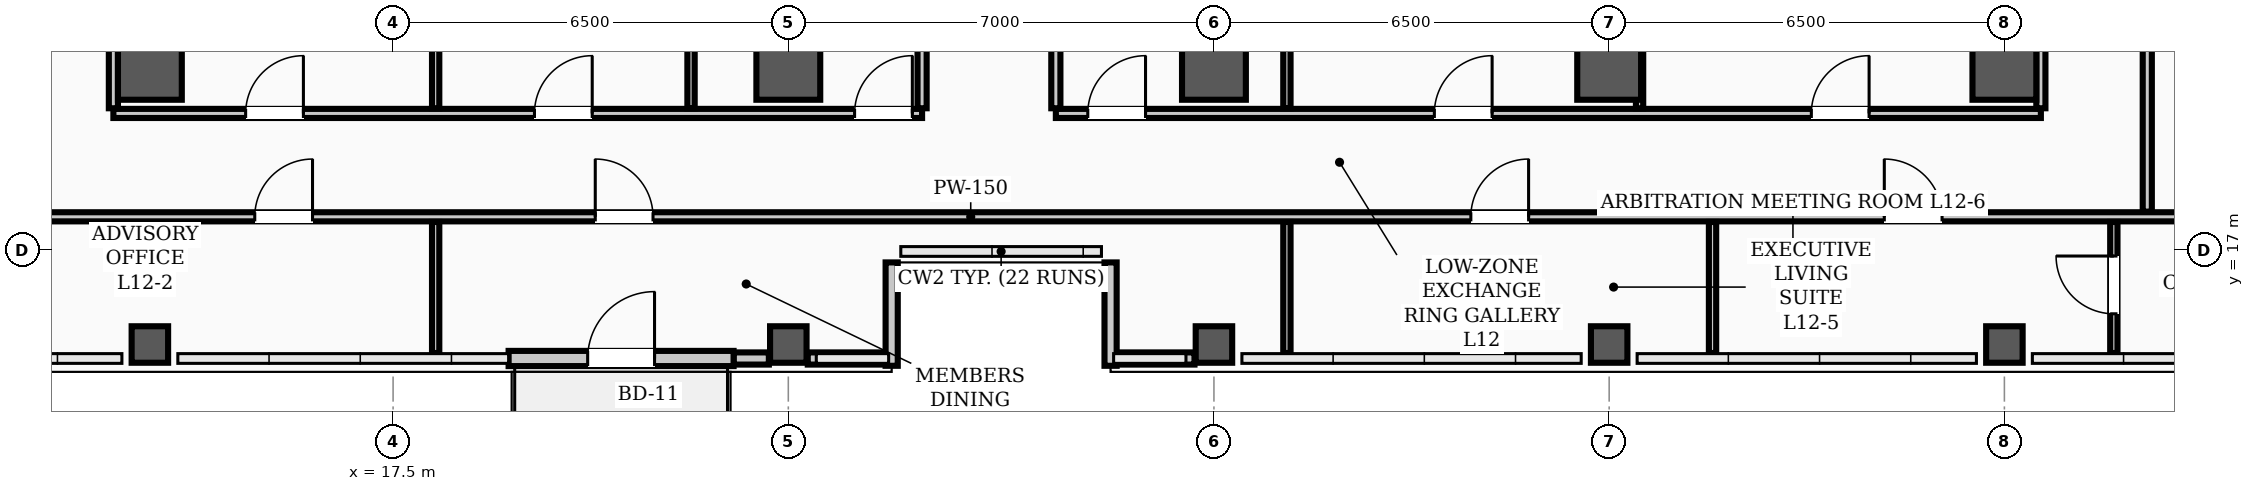
"""IFC4 building model, lengths in metres.
Left out: names, types, materials, properties, quantities, classifications, styles, units other than length and angle.
Written with IfcOpenShell. Run it as: python <this file> out.ifc"""

import sys

from ifc_helpers import new_model, si_unit, direction, frame, frame_2d, origin, origin_2d, place, context, subcontext, project, spatial, rectangle, hollow_rectangle, extrude, element, fill, save


model = new_model("IFC4")
c1 = context("Model", 3, precision=1e-05, world=origin(), true_north=direction((0.0, 1.0)))
c2 = subcontext(c1, "Body", "Model", "MODEL_VIEW")
j1 = project(units=[si_unit("LENGTHUNIT", "METRE"), si_unit("PLANEANGLEUNIT", "RADIAN")], contexts=[c1])
p1 = place(None, origin())
s1 = spatial("IfcSite", under=j1, at=p1, CompositionType="ELEMENT")
p2 = place(p1, origin())
s2 = spatial("IfcBuilding", under=s1, at=p2, CompositionType="ELEMENT")
p3 = place(p2, frame((0.0, 0.0, 49.9)))
s3 = spatial("IfcBuildingStorey", under=s2, at=p3, CompositionType="ELEMENT", Elevation=49.9)
for number, where, z_axis, x_axis in (
    (1, (13.5, 20.0, 0.0), (0.0, 0.0, 1.0), (1.0, 0.0, 0.0)),
    (2, (24.0, 20.0, 0.0), (0.0, 0.0, 1.0), (1.0, 0.0, 0.0)),
    (3, (31.0, 20.0, 0.0), (0.0, 0.0, 1.0), (1.0, 0.0, 0.0)),
    (4, (37.5, 20.0, 0.0), (0.0, 0.0, 1.0), (1.0, 0.0, 0.0)),
    (5, (44.0, 20.0, 0.0), (0.0, 0.0, 1.0), (1.0, 0.0, 0.0)),
):
    element("IfcColumn", number, at=place(p3, frame(where, z_axis=z_axis, x_axis=x_axis)), inside=s3, PredefinedType="COLUMN", context=c2, shape_type="SweptSolid", body=[
        extrude(hollow_rectangle(XDim=1.05, YDim=1.05, WallThickness=0.038, InnerFilletRadius=0.019, OuterFilletRadius=0.057, at=origin_2d()), origin(), (0.0, 0.0, 1.0), 3.9),
    ])
for number, where, z_axis, x_axis in (
    (6, (13.5, 15.45, 0.0), (0.0, 0.0, 1.0), (1.0, 0.0, 0.0)),
    (7, (24.0, 15.45, 0.0), (0.0, 0.0, 1.0), (1.0, 0.0, 0.0)),
    (8, (31.0, 15.45, 0.0), (0.0, 0.0, 1.0), (1.0, 0.0, 0.0)),
    (9, (37.5, 15.45, 0.0), (0.0, 0.0, 1.0), (1.0, 0.0, 0.0)),
    (10, (44.0, 15.45, 0.0), (0.0, 0.0, 1.0), (1.0, 0.0, 0.0)),
):
    element("IfcColumn", number, at=place(p3, frame(where, z_axis=z_axis, x_axis=x_axis)), inside=s3, PredefinedType="COLUMN", context=c2, shape_type="SweptSolid", body=[
        extrude(hollow_rectangle(XDim=0.6, YDim=0.6, WallThickness=0.026, InnerFilletRadius=0.013, OuterFilletRadius=0.039, at=origin_2d()), origin(), (0.0, 0.0, 1.0), 3.9),
    ])
p4 = place(p3, frame((23.1, 15.22, 0.0), z_axis=(0.0, 0.0, 1.0), x_axis=(1.0, 0.0, 0.0)))
e11 = element("IfcWall", 11, at=p4, inside=s3, PredefinedType="PARAPET", context=c2, shape_type="SweptSolid", body=[
    extrude(rectangle(XDim=0.58, YDim=0.2, at=frame_2d((0.29, 0.0))), origin(), (0.0, 0.0, 1.0), 1.2),
])
for number, where, z_axis, x_axis in (
    (12, (24.32, 15.22, 0.0), (0.0, 0.0, 1.0), (1.0, 0.0, 0.0)),
    (13, (29.35, 15.22, 0.0), (0.0, 0.0, 1.0), (1.0, 0.0, 0.0)),
):
    element("IfcWall", number, at=place(p3, frame(where, z_axis=z_axis, x_axis=x_axis)), inside=s3, PredefinedType="PARAPET", context=c2, shape_type="SweptSolid", body=[
        extrude(rectangle(XDim=1.33, YDim=0.2, at=frame_2d((0.665, 0.0))), origin(), (0.0, 0.0, 1.0), 1.2),
    ])
for number, where, z_axis, x_axis in (
    (14, (25.7, 15.1, 0.0), (0.0, 0.0, 1.0), (0.0, 1.0, 0.0)),
    (15, (29.3, 16.8, 0.0), (0.0, 0.0, 1.0), (0.0, -1.0, 0.0)),
):
    element("IfcWall", number, at=place(p3, frame(where, z_axis=z_axis, x_axis=x_axis)), inside=s3, PredefinedType="PARAPET", context=c2, shape_type="SweptSolid", body=[
        extrude(rectangle(XDim=1.7, YDim=0.2, at=frame_2d((0.85, 0.0))), origin(), (0.0, 0.0, 1.0), 1.2),
    ])
p5 = place(p3, frame((19.4, 15.22, 0.0), z_axis=(0.0, 0.0, 1.0), x_axis=(1.0, 0.0, 0.0)))
e16 = element("IfcWall", 16, at=p5, inside=s3, PredefinedType="STANDARD", context=c2, shape_type="SweptSolid", body=[
    extrude(rectangle(XDim=3.7, YDim=0.25, at=frame_2d((1.85, 0.0))), origin(), (0.0, 0.0, 1.0), 2.22),
])
p6 = place(p5, frame((1.3, 0.0, 0.0)))
e17 = element("IfcOpeningElement", 17, at=p6, cuts=e16, PredefinedType="OPENING", context=c2, shape_type="SweptSolid", body=[
    extrude(rectangle(XDim=1.1, YDim=2.2, at=frame_2d((0.55, 1.1))), frame((0.0, 0.135, 0.0), z_axis=(0.0, -1.0, 0.0), x_axis=(1.0, 0.0, 0.0)), (0.0, 0.0, 1.0), 0.27),
])
p7 = place(p3, frame((4.66, 17.55, 0.0), z_axis=(0.0, 0.0, 1.0), x_axis=(1.0, 0.0, 0.0)))
e18 = element("IfcWall", 18, at=p7, inside=s3, PredefinedType="PARTITIONING", context=c2, shape_type="SweptSolid", body=[
    extrude(rectangle(XDim=44.68, YDim=0.15, at=frame_2d((22.34, 0.0))), origin(), (0.0, 0.0, 1.0), 2.24),
])
p8 = place(p7, frame((10.565, 0.0, 0.0)))
e19 = element("IfcOpeningElement", 19, at=p8, cuts=e18, PredefinedType="OPENING", context=c2, shape_type="SweptSolid", body=[
    extrude(rectangle(XDim=0.95, YDim=2.08, at=frame_2d((0.475, 1.04))), frame((0.0, 0.085, 0.0), z_axis=(0.0, -1.0, 0.0), x_axis=(1.0, 0.0, 0.0)), (0.0, 0.0, 1.0), 0.17),
])
p9 = place(p7, frame((16.165, 0.0, 0.0)))
e20 = element("IfcOpeningElement", 20, at=p9, cuts=e18, PredefinedType="OPENING", context=c2, shape_type="SweptSolid", body=[
    extrude(rectangle(XDim=0.95, YDim=2.08, at=frame_2d((0.475, 1.04))), frame((0.0, 0.085, 0.0), z_axis=(0.0, -1.0, 0.0), x_axis=(1.0, 0.0, 0.0)), (0.0, 0.0, 1.0), 0.17),
])
p10 = place(p7, frame((30.565, 0.0, 0.0)))
e21 = element("IfcOpeningElement", 21, at=p10, cuts=e18, PredefinedType="OPENING", context=c2, shape_type="SweptSolid", body=[
    extrude(rectangle(XDim=0.95, YDim=2.08, at=frame_2d((0.475, 1.04))), frame((0.0, 0.085, 0.0), z_axis=(0.0, -1.0, 0.0), x_axis=(1.0, 0.0, 0.0)), (0.0, 0.0, 1.0), 0.17),
])
p11 = place(p7, frame((37.365, 0.0, 0.0)))
e22 = element("IfcOpeningElement", 22, at=p11, cuts=e18, PredefinedType="OPENING", context=c2, shape_type="SweptSolid", body=[
    extrude(rectangle(XDim=0.95, YDim=2.08, at=frame_2d((0.475, 1.04))), frame((0.0, 0.085, 0.0), z_axis=(0.0, -1.0, 0.0), x_axis=(1.0, 0.0, 0.0)), (0.0, 0.0, 1.0), 0.17),
])
p12 = place(p3, frame((12.9, 19.25, 0.0), z_axis=(0.0, 0.0, 1.0), x_axis=(1.0, 0.0, 0.0)))
e23 = element("IfcWall", 23, at=p12, inside=s3, PredefinedType="PARTITIONING", context=c2, shape_type="SweptSolid", body=[
    extrude(rectangle(XDim=13.3, YDim=0.15, at=frame_2d((6.65, 0.0))), origin(), (0.0, 0.0, 1.0), 2.24),
])
p13 = place(p12, frame((2.175, 0.0, 0.0)))
e24 = element("IfcOpeningElement", 24, at=p13, cuts=e23, PredefinedType="OPENING", context=c2, shape_type="SweptSolid", body=[
    extrude(rectangle(XDim=0.95, YDim=2.08, at=frame_2d((0.475, 1.04))), frame((0.0, 0.085, 0.0), z_axis=(0.0, -1.0, 0.0), x_axis=(1.0, 0.0, 0.0)), (0.0, 0.0, 1.0), 0.17),
])
p14 = place(p12, frame((6.925, 0.0, 0.0)))
e25 = element("IfcOpeningElement", 25, at=p14, cuts=e23, PredefinedType="OPENING", context=c2, shape_type="SweptSolid", body=[
    extrude(rectangle(XDim=0.95, YDim=2.08, at=frame_2d((0.475, 1.04))), frame((0.0, 0.085, 0.0), z_axis=(0.0, -1.0, 0.0), x_axis=(1.0, 0.0, 0.0)), (0.0, 0.0, 1.0), 0.17),
])
p15 = place(p12, frame((12.19, 0.0, 0.0)))
e26 = element("IfcOpeningElement", 26, at=p15, cuts=e23, PredefinedType="OPENING", context=c2, shape_type="SweptSolid", body=[
    extrude(rectangle(XDim=0.95, YDim=2.08, at=frame_2d((0.475, 1.04))), frame((0.0, 0.085, 0.0), z_axis=(0.0, -1.0, 0.0), x_axis=(1.0, 0.0, 0.0)), (0.0, 0.0, 1.0), 0.17),
])
p16 = place(p3, frame((28.4, 19.25, 0.0), z_axis=(0.0, 0.0, 1.0), x_axis=(1.0, 0.0, 0.0)))
e27 = element("IfcWall", 27, at=p16, inside=s3, PredefinedType="PARTITIONING", context=c2, shape_type="SweptSolid", body=[
    extrude(rectangle(XDim=16.2, YDim=0.15, at=frame_2d((8.1, 0.0))), origin(), (0.0, 0.0, 1.0), 2.24),
])
p17 = place(p16, frame((0.525, 0.0, 0.0)))
e28 = element("IfcOpeningElement", 28, at=p17, cuts=e27, PredefinedType="OPENING", context=c2, shape_type="SweptSolid", body=[
    extrude(rectangle(XDim=0.95, YDim=2.08, at=frame_2d((0.475, 1.04))), frame((0.0, 0.085, 0.0), z_axis=(0.0, -1.0, 0.0), x_axis=(1.0, 0.0, 0.0)), (0.0, 0.0, 1.0), 0.17),
])
p18 = place(p16, frame((6.225, 0.0, 0.0)))
e29 = element("IfcOpeningElement", 29, at=p18, cuts=e27, PredefinedType="OPENING", context=c2, shape_type="SweptSolid", body=[
    extrude(rectangle(XDim=0.95, YDim=2.08, at=frame_2d((0.475, 1.04))), frame((0.0, 0.085, 0.0), z_axis=(0.0, -1.0, 0.0), x_axis=(1.0, 0.0, 0.0)), (0.0, 0.0, 1.0), 0.17),
])
p19 = place(p16, frame((12.425, 0.0, 0.0)))
e30 = element("IfcOpeningElement", 30, at=p19, cuts=e27, PredefinedType="OPENING", context=c2, shape_type="SweptSolid", body=[
    extrude(rectangle(XDim=0.95, YDim=2.08, at=frame_2d((0.475, 1.04))), frame((0.0, 0.085, 0.0), z_axis=(0.0, -1.0, 0.0), x_axis=(1.0, 0.0, 0.0)), (0.0, 0.0, 1.0), 0.17),
])
for number, where, z_axis, x_axis in (
    (31, (26.2, 19.335, 0.0), (0.0, 0.0, 1.0), (0.0, 1.0, 0.0)),
    (32, (28.4, 19.335, 0.0), (0.0, 0.0, 1.0), (0.0, 1.0, 0.0)),
    (33, (12.9, 19.335, 0.0), (0.0, 0.0, 1.0), (0.0, 1.0, 0.0)),
):
    element("IfcWall", number, at=place(p3, frame(where, z_axis=z_axis, x_axis=x_axis)), inside=s3, PredefinedType="PARTITIONING", context=c2, shape_type="SweptSolid", body=[
        extrude(rectangle(XDim=7.38, YDim=0.15, at=frame_2d((3.69, 0.0))), origin(), (0.0, 0.0, 1.0), 2.24),
    ])
p20 = place(p3, frame((46.35, 17.635, 0.0), z_axis=(0.0, 0.0, 1.0), x_axis=(0.0, 1.0, 0.0)))
e34 = element("IfcWall", 34, at=p20, inside=s3, PredefinedType="PARTITIONING", context=c2, shape_type="SweptSolid", body=[
    extrude(rectangle(XDim=22.53, YDim=0.15, at=frame_2d((11.265, 0.0))), origin(), (0.0, 0.0, 1.0), 2.24),
])
p21 = place(p20, frame((3.465, 0.0, 0.0)))
e35 = element("IfcOpeningElement", 35, at=p21, cuts=e34, PredefinedType="OPENING", context=c2, shape_type="SweptSolid", body=[
    extrude(rectangle(XDim=0.95, YDim=2.08, at=frame_2d((0.475, 1.04))), frame((0.0, 0.085, 0.0), z_axis=(0.0, -1.0, 0.0), x_axis=(1.0, 0.0, 0.0)), (0.0, 0.0, 1.0), 0.17),
])
p22 = place(p20, frame((8.69, 0.0, 0.0)))
e36 = element("IfcOpeningElement", 36, at=p22, cuts=e34, PredefinedType="OPENING", context=c2, shape_type="SweptSolid", body=[
    extrude(rectangle(XDim=0.95, YDim=2.08, at=frame_2d((0.475, 1.04))), frame((0.0, 0.085, 0.0), z_axis=(0.0, -1.0, 0.0), x_axis=(1.0, 0.0, 0.0)), (0.0, 0.0, 1.0), 0.17),
])
p23 = place(p20, frame((15.69, 0.0, 0.0)))
e37 = element("IfcOpeningElement", 37, at=p23, cuts=e34, PredefinedType="OPENING", context=c2, shape_type="SweptSolid", body=[
    extrude(rectangle(XDim=0.95, YDim=2.08, at=frame_2d((0.475, 1.04))), frame((0.0, 0.085, 0.0), z_axis=(0.0, -1.0, 0.0), x_axis=(1.0, 0.0, 0.0)), (0.0, 0.0, 1.0), 0.17),
])
p24 = place(p20, frame((20.115, 0.0, 0.0)))
e38 = element("IfcOpeningElement", 38, at=p24, cuts=e34, PredefinedType="OPENING", context=c2, shape_type="SweptSolid", body=[
    extrude(rectangle(XDim=0.95, YDim=2.08, at=frame_2d((0.475, 1.04))), frame((0.0, 0.085, 0.0), z_axis=(0.0, -1.0, 0.0), x_axis=(1.0, 0.0, 0.0)), (0.0, 0.0, 1.0), 0.17),
])
p25 = place(p3, frame((44.6, 19.335, 0.0), z_axis=(0.0, 0.0, 1.0), x_axis=(0.0, 1.0, 0.0)))
e39 = element("IfcWall", 39, at=p25, inside=s3, PredefinedType="PARTITIONING", context=c2, shape_type="SweptSolid", body=[
    extrude(rectangle(XDim=7.38, YDim=0.15, at=frame_2d((3.69, 0.0))), origin(), (0.0, 0.0, 1.0), 2.24),
])
for number, where, z_axis, x_axis in (
    (40, (18.2, 15.31, 0.0), (0.0, 0.0, 1.0), (0.0, 1.0, 0.0)),
    (41, (32.2, 15.31, 0.0), (0.0, 0.0, 1.0), (0.0, 1.0, 0.0)),
    (42, (39.2, 15.31, 0.0), (0.0, 0.0, 1.0), (0.0, 1.0, 0.0)),
):
    element("IfcWall", number, at=place(p3, frame(where, z_axis=z_axis, x_axis=x_axis)), inside=s3, PredefinedType="PARTITIONING", context=c2, shape_type="SweptSolid", body=[
        extrude(rectangle(XDim=2.155, YDim=0.12, at=frame_2d((1.078, 0.0))), origin(), (0.0, 0.0, 1.0), 2.24),
    ])
p26 = place(p3, frame((45.8, 15.31, 0.0), z_axis=(0.0, 0.0, 1.0), x_axis=(0.0, 1.0, 0.0)))
e43 = element("IfcWall", 43, at=p26, inside=s3, PredefinedType="PARTITIONING", context=c2, shape_type="SweptSolid", body=[
    extrude(rectangle(XDim=2.155, YDim=0.12, at=frame_2d((1.078, 0.0))), origin(), (0.0, 0.0, 1.0), 3.66),
])
p27 = place(p26, frame((0.645, 0.0, 0.0)))
e44 = element("IfcOpeningElement", 44, at=p27, cuts=e43, PredefinedType="OPENING", context=c2, shape_type="SweptSolid", body=[
    extrude(rectangle(XDim=0.95, YDim=2.08, at=frame_2d((0.475, 1.04))), frame((0.0, 0.07, 0.0), z_axis=(0.0, -1.0, 0.0), x_axis=(1.0, 0.0, 0.0)), (0.0, 0.0, 1.0), 0.14),
])
for number, where, z_axis, x_axis in (
    (45, (18.2, 19.335, 0.0), (0.0, 0.0, 1.0), (0.0, 1.0, 0.0)),
    (46, (22.4, 19.335, 0.0), (0.0, 0.0, 1.0), (0.0, 1.0, 0.0)),
    (47, (32.2, 19.335, 0.0), (0.0, 0.0, 1.0), (0.0, 1.0, 0.0)),
    (48, (38.0, 19.335, 0.0), (0.0, 0.0, 1.0), (0.0, 1.0, 0.0)),
):
    element("IfcWall", number, at=place(p3, frame(where, z_axis=z_axis, x_axis=x_axis)), inside=s3, PredefinedType="PARTITIONING", context=c2, shape_type="SweptSolid", body=[
        extrude(rectangle(XDim=7.38, YDim=0.12, at=frame_2d((3.69, 0.0))), origin(), (0.0, 0.0, 1.0), 2.24),
    ])
p28 = place(p6, origin())
e49 = element("IfcDoor", 49, at=p28, inside=s3, OperationType="SINGLE_SWING_RIGHT", PredefinedType="DOOR", context=c2, shape_type="SweptSolid", body=[
    extrude(rectangle(XDim=1.1, YDim=2.2, at=frame_2d((0.55, 1.1))), frame((0.0, 0.025, 0.0), z_axis=(0.0, -1.0, 0.0), x_axis=(1.0, 0.0, 0.0)), (0.0, 0.0, 1.0), 0.05),
])
fill(e17, e49)
p29 = place(p8, origin())
e50 = element("IfcDoor", 50, at=p29, inside=s3, OperationType="SINGLE_SWING_RIGHT", PredefinedType="DOOR", context=c2, shape_type="SweptSolid", body=[
    extrude(rectangle(XDim=0.95, YDim=2.08, at=frame_2d((0.475, 1.04))), frame((0.0, 0.025, 0.0), z_axis=(0.0, -1.0, 0.0), x_axis=(1.0, 0.0, 0.0)), (0.0, 0.0, 1.0), 0.05),
])
fill(e19, e50)
p30 = place(p9, origin())
e51 = element("IfcDoor", 51, at=p30, inside=s3, OperationType="SINGLE_SWING_LEFT", PredefinedType="DOOR", context=c2, shape_type="SweptSolid", body=[
    extrude(rectangle(XDim=0.95, YDim=2.08, at=frame_2d((0.475, 1.04))), frame((0.0, 0.025, 0.0), z_axis=(0.0, -1.0, 0.0), x_axis=(1.0, 0.0, 0.0)), (0.0, 0.0, 1.0), 0.05),
])
fill(e20, e51)
p31 = place(p10, origin())
e52 = element("IfcDoor", 52, at=p31, inside=s3, OperationType="SINGLE_SWING_RIGHT", PredefinedType="DOOR", context=c2, shape_type="SweptSolid", body=[
    extrude(rectangle(XDim=0.95, YDim=2.08, at=frame_2d((0.475, 1.04))), frame((0.0, 0.025, 0.0), z_axis=(0.0, -1.0, 0.0), x_axis=(1.0, 0.0, 0.0)), (0.0, 0.0, 1.0), 0.05),
])
fill(e21, e52)
p32 = place(p11, origin())
e53 = element("IfcDoor", 53, at=p32, inside=s3, OperationType="SINGLE_SWING_LEFT", PredefinedType="DOOR", context=c2, shape_type="SweptSolid", body=[
    extrude(rectangle(XDim=0.95, YDim=2.08, at=frame_2d((0.475, 1.04))), frame((0.0, 0.025, 0.0), z_axis=(0.0, -1.0, 0.0), x_axis=(1.0, 0.0, 0.0)), (0.0, 0.0, 1.0), 0.05),
])
fill(e22, e53)
p33 = place(p27, origin())
e54 = element("IfcDoor", 54, at=p33, inside=s3, OperationType="SINGLE_SWING_RIGHT", PredefinedType="DOOR", context=c2, shape_type="SweptSolid", body=[
    extrude(rectangle(XDim=0.95, YDim=2.08, at=frame_2d((0.475, 1.04))), frame((0.0, 0.025, 0.0), z_axis=(0.0, -1.0, 0.0), x_axis=(1.0, 0.0, 0.0)), (0.0, 0.0, 1.0), 0.05),
])
fill(e44, e54)
p34 = place(p13, origin())
e55 = element("IfcDoor", 55, at=p34, inside=s3, OperationType="SINGLE_SWING_RIGHT", PredefinedType="DOOR", context=c2, shape_type="SweptSolid", body=[
    extrude(rectangle(XDim=0.95, YDim=2.08, at=frame_2d((0.475, 1.04))), frame((0.0, 0.025, 0.0), z_axis=(0.0, -1.0, 0.0), x_axis=(1.0, 0.0, 0.0)), (0.0, 0.0, 1.0), 0.05),
])
fill(e24, e55)
p35 = place(p14, origin())
e56 = element("IfcDoor", 56, at=p35, inside=s3, OperationType="SINGLE_SWING_RIGHT", PredefinedType="DOOR", context=c2, shape_type="SweptSolid", body=[
    extrude(rectangle(XDim=0.95, YDim=2.08, at=frame_2d((0.475, 1.04))), frame((0.0, 0.025, 0.0), z_axis=(0.0, -1.0, 0.0), x_axis=(1.0, 0.0, 0.0)), (0.0, 0.0, 1.0), 0.05),
])
fill(e25, e56)
p36 = place(p15, origin())
e57 = element("IfcDoor", 57, at=p36, inside=s3, OperationType="SINGLE_SWING_RIGHT", PredefinedType="DOOR", context=c2, shape_type="SweptSolid", body=[
    extrude(rectangle(XDim=0.95, YDim=2.08, at=frame_2d((0.475, 1.04))), frame((0.0, 0.025, 0.0), z_axis=(0.0, -1.0, 0.0), x_axis=(1.0, 0.0, 0.0)), (0.0, 0.0, 1.0), 0.05),
])
fill(e26, e57)
p37 = place(p17, origin())
e58 = element("IfcDoor", 58, at=p37, inside=s3, OperationType="SINGLE_SWING_RIGHT", PredefinedType="DOOR", context=c2, shape_type="SweptSolid", body=[
    extrude(rectangle(XDim=0.95, YDim=2.08, at=frame_2d((0.475, 1.04))), frame((0.0, 0.025, 0.0), z_axis=(0.0, -1.0, 0.0), x_axis=(1.0, 0.0, 0.0)), (0.0, 0.0, 1.0), 0.05),
])
fill(e28, e58)
p38 = place(p18, origin())
e59 = element("IfcDoor", 59, at=p38, inside=s3, OperationType="SINGLE_SWING_RIGHT", PredefinedType="DOOR", context=c2, shape_type="SweptSolid", body=[
    extrude(rectangle(XDim=0.95, YDim=2.08, at=frame_2d((0.475, 1.04))), frame((0.0, 0.025, 0.0), z_axis=(0.0, -1.0, 0.0), x_axis=(1.0, 0.0, 0.0)), (0.0, 0.0, 1.0), 0.05),
])
fill(e29, e59)
p39 = place(p19, origin())
e60 = element("IfcDoor", 60, at=p39, inside=s3, OperationType="SINGLE_SWING_RIGHT", PredefinedType="DOOR", context=c2, shape_type="SweptSolid", body=[
    extrude(rectangle(XDim=0.95, YDim=2.08, at=frame_2d((0.475, 1.04))), frame((0.0, 0.025, 0.0), z_axis=(0.0, -1.0, 0.0), x_axis=(1.0, 0.0, 0.0)), (0.0, 0.0, 1.0), 0.05),
])
fill(e30, e60)
save(model, sys.argv[1])
